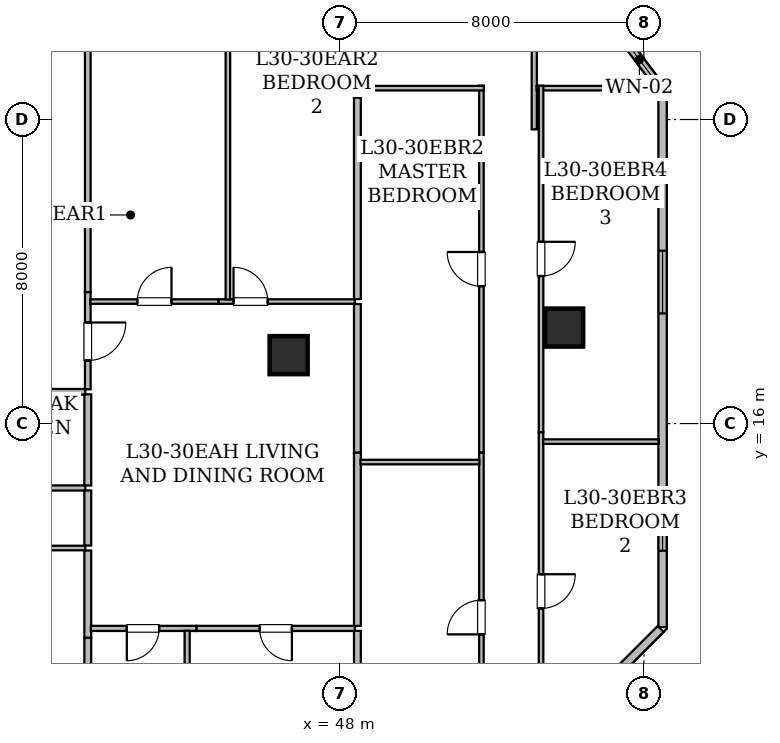
"""IFC4 building model, lengths in metres.
Left out: names, types, materials, properties, quantities, classifications, styles, units other than length and angle.
Written with IfcOpenShell. Run it as: python <this file> out.ifc"""

import sys

from ifc_helpers import new_model, si_unit, direction, frame, frame_2d, origin, origin_2d, place, context, subcontext, project, spatial, rectangle, hollow_rectangle, extrude, element, fill, save


model = new_model("IFC4")
c1 = context("Model", 3, precision=1e-05, world=origin(), true_north=direction((0.0, 1.0)))
c2 = subcontext(c1, "Body", "Model", "MODEL_VIEW")
j1 = project(units=[si_unit("LENGTHUNIT", "METRE"), si_unit("PLANEANGLEUNIT", "RADIAN")], contexts=[c1])
p1 = place(None, origin())
s1 = spatial("IfcSite", under=j1, at=p1, CompositionType="ELEMENT")
p2 = place(p1, origin())
s2 = spatial("IfcBuilding", under=s1, at=p2, CompositionType="ELEMENT")
p3 = place(p2, frame((0.0, 0.0, 120.15)))
s3 = spatial("IfcBuildingStorey", under=s2, at=p3, CompositionType="ELEMENT", Elevation=120.15)
for number, where, z_axis, x_axis in (
    (1, (53.9, 18.525, 0.0), (0.0, 0.0, 1.0), (1.0, 0.0, 0.0)),
    (2, (46.65, 17.8, 0.0), (0.0, 0.0, 1.0), (1.0, 0.0, 0.0)),
):
    element("IfcColumn", number, at=place(p3, frame(where, z_axis=z_axis, x_axis=x_axis)), inside=s3, PredefinedType="COLUMN", context=c2, shape_type="SweptSolid", body=[
        extrude(hollow_rectangle(XDim=1.0, YDim=1.0, WallThickness=0.05, at=origin_2d()), origin(), (0.0, 0.0, 1.0), 3.65),
    ])
p4 = place(p3, frame((54.119, 27.924, 0.0), z_axis=(0.0, 0.0, 1.0), x_axis=(0.600039540588, -0.799970343032, 0.0)))
e3 = element("IfcWall", 3, at=p4, inside=s3, PredefinedType="STANDARD", context=c2, shape_type="SweptSolid", body=[
    extrude(rectangle(XDim=3.952, YDim=0.22, at=frame_2d((1.976, 0.0))), origin(), (0.0, 0.0, 1.0), 3.43),
])
p5 = place(p4, frame((2.184, 0.0, 0.85)))
e4 = element("IfcOpeningElement", 4, at=p5, cuts=e3, PredefinedType="OPENING", context=c2, shape_type="SweptSolid", body=[
    extrude(rectangle(XDim=1.5, YDim=1.6, at=frame_2d((0.75, 0.8))), frame((0.0, 0.12, 0.0), z_axis=(0.0, -1.0, 0.0), x_axis=(1.0, 0.0, 0.0)), (0.0, 0.0, 1.0), 0.24),
])
p6 = place(p3, frame((56.49, 24.707, 0.0), z_axis=(0.0, 0.0, 1.0), x_axis=(0.0, -1.0, 0.0)))
e5 = element("IfcWall", 5, at=p6, inside=s3, PredefinedType="STANDARD", context=c2, shape_type="SweptSolid", body=[
    extrude(rectangle(XDim=14.061, YDim=0.22, at=frame_2d((7.031, 0.0))), origin(), (0.0, 0.0, 1.0), 3.43),
])
p7 = place(p6, frame((10.404, 0.0, 0.85)))
e6 = element("IfcOpeningElement", 6, at=p7, cuts=e5, PredefinedType="OPENING", context=c2, shape_type="SweptSolid", body=[
    extrude(rectangle(XDim=1.65, YDim=1.55, at=frame_2d((0.825, 0.775))), frame((0.0, 0.12, 0.0), z_axis=(0.0, -1.0, 0.0), x_axis=(1.0, 0.0, 0.0)), (0.0, 0.0, 1.0), 0.24),
])
p8 = place(p6, frame((4.159, 0.0, 0.85)))
e7 = element("IfcOpeningElement", 7, at=p8, cuts=e5, PredefinedType="OPENING", context=c2, shape_type="SweptSolid", body=[
    extrude(rectangle(XDim=1.65, YDim=1.55, at=frame_2d((0.825, 0.775))), frame((0.0, 0.12, 0.0), z_axis=(0.0, -1.0, 0.0), x_axis=(1.0, 0.0, 0.0)), (0.0, 0.0, 1.0), 0.24),
])
p9 = place(p3, frame((56.44, 10.596, 0.0), z_axis=(0.0, 0.0, 1.0), x_axis=(-0.707106781187, -0.707106781187, 0.0)))
e8 = element("IfcWall", 8, at=p9, inside=s3, PredefinedType="STANDARD", context=c2, shape_type="SweptSolid", body=[
    extrude(rectangle(XDim=5.778, YDim=0.22, at=frame_2d((2.889, 0.0))), origin(), (0.0, 0.0, 1.0), 3.43),
])
p10 = place(p3, frame((41.3, 16.835, 0.0), z_axis=(0.0, 0.0, 1.0), x_axis=(-1.0, 0.0, 0.0)))
e9 = element("IfcWall", 9, at=p10, inside=s3, PredefinedType="STANDARD", context=c2, shape_type="SweptSolid", body=[
    extrude(rectangle(XDim=7.001, YDim=0.15, at=frame_2d((3.5, 0.0))), origin(), (0.0, 0.0, 1.0), 2.647),
])
p11 = place(p3, frame((41.365, 19.459, 0.0), z_axis=(0.0, 0.0, 1.0), x_axis=(0.0, -1.0, 0.0)))
e10 = element("IfcWall", 10, at=p11, inside=s3, PredefinedType="STANDARD", context=c2, shape_type="SweptSolid", body=[
    extrude(rectangle(XDim=2.559, YDim=0.15, at=frame_2d((1.28, 0.0))), origin(), (0.0, 0.0, 1.0), 2.647),
])
p12 = place(p11, frame((0.8, 0.0, 0.0)))
e11 = element("IfcOpeningElement", 11, at=p12, cuts=e10, PredefinedType="OPENING", context=c2, shape_type="SweptSolid", body=[
    extrude(rectangle(XDim=1.0, YDim=2.15, at=frame_2d((0.5, 1.075))), frame((0.0, 0.085, 0.0), z_axis=(0.0, -1.0, 0.0), x_axis=(1.0, 0.0, 0.0)), (0.0, 0.0, 1.0), 0.17),
])
p13 = place(p3, frame((41.365, 30.05, 0.0), z_axis=(0.0, 0.0, 1.0), x_axis=(0.0, -1.0, 0.0)))
e12 = element("IfcWall", 12, at=p13, inside=s3, PredefinedType="STANDARD", context=c2, shape_type="SweptSolid", body=[
    extrude(rectangle(XDim=10.591, YDim=0.15, at=frame_2d((5.295, 0.0))), origin(), (0.0, 0.0, 1.0), 3.013),
])
p14 = place(p3, frame((33.985, 14.305, 0.0), z_axis=(0.0, 0.0, 1.0), x_axis=(1.0, 0.0, 0.0)))
e13 = element("IfcWall", 13, at=p14, inside=s3, PredefinedType="PARTITIONING", context=c2, shape_type="SweptSolid", body=[
    extrude(rectangle(XDim=7.315, YDim=0.135, at=frame_2d((3.657, 0.0))), origin(), (0.0, 0.0, 1.0), 2.647),
])
p15 = place(p14, frame((3.233, 0.0, 0.0)))
e14 = element("IfcOpeningElement", 14, at=p15, cuts=e13, PredefinedType="OPENING", context=c2, shape_type="SweptSolid", body=[
    extrude(rectangle(XDim=0.85, YDim=2.1, at=frame_2d((0.425, 1.05))), frame((0.0, 0.077, 0.0), z_axis=(0.0, -1.0, 0.0), x_axis=(1.0, 0.0, 0.0)), (0.0, 0.0, 1.0), 0.155),
])
p16 = place(p3, frame((41.3, 12.725, 0.0), z_axis=(0.0, 0.0, 1.0), x_axis=(-1.0, 0.0, 0.0)))
e15 = element("IfcWall", 15, at=p16, inside=s3, PredefinedType="PARTITIONING", context=c2, shape_type="SweptSolid", body=[
    extrude(rectangle(XDim=7.693, YDim=0.12, at=frame_2d((3.847, 0.0))), origin(), (0.0, 0.0, 1.0), 2.647),
])
p17 = place(p16, frame((3.396, 0.0, 0.0)))
e16 = element("IfcOpeningElement", 16, at=p17, cuts=e15, PredefinedType="OPENING", context=c2, shape_type="SweptSolid", body=[
    extrude(rectangle(XDim=0.9, YDim=2.1, at=frame_2d((0.45, 1.05))), frame((0.0, 0.07, 0.0), z_axis=(0.0, -1.0, 0.0), x_axis=(1.0, 0.0, 0.0)), (0.0, 0.0, 1.0), 0.14),
])
p18 = place(p3, frame((41.365, 14.24, 0.0), z_axis=(0.0, 0.0, 1.0), x_axis=(0.0, -1.0, 0.0)))
e17 = element("IfcWall", 17, at=p18, inside=s3, PredefinedType="STANDARD", context=c2, shape_type="SweptSolid", body=[
    extrude(rectangle(XDim=1.45, YDim=0.18, at=frame_2d((0.725, 0.0))), origin(), (0.0, 0.0, 1.0), 3.43),
])
p19 = place(p3, frame((41.365, 16.77, 0.0), z_axis=(0.0, 0.0, 1.0), x_axis=(0.0, -1.0, 0.0)))
e18 = element("IfcWall", 18, at=p19, inside=s3, PredefinedType="STANDARD", context=c2, shape_type="SweptSolid", body=[
    extrude(rectangle(XDim=2.4, YDim=0.18, at=frame_2d((1.2, 0.0))), origin(), (0.0, 0.0, 1.0), 3.43),
])
p20 = place(p3, frame((41.365, 12.66, 0.0), z_axis=(0.0, 0.0, 1.0), x_axis=(0.0, -1.0, 0.0)))
e19 = element("IfcWall", 19, at=p20, inside=s3, PredefinedType="STANDARD", context=c2, shape_type="SweptSolid", body=[
    extrude(rectangle(XDim=2.299, YDim=0.18, at=frame_2d((1.149, 0.0))), origin(), (0.0, 0.0, 1.0), 3.43),
])
p21 = place(p3, frame((41.365, 10.361, 0.0), z_axis=(0.0, 0.0, 1.0), x_axis=(0.0, -1.0, 0.0)))
e20 = element("IfcWall", 20, at=p21, inside=s3, PredefinedType="STANDARD", context=c2, shape_type="SweptSolid", body=[
    extrude(rectangle(XDim=3.749, YDim=0.18, at=frame_2d((1.875, 0.0))), origin(), (0.0, 0.0, 1.0), 2.876),
])
p22 = place(p3, frame((44.803, 19.21, 0.0), z_axis=(0.0, 0.0, 1.0), x_axis=(1.0, 0.0, 0.0)))
e21 = element("IfcWall", 21, at=p22, inside=s3, PredefinedType="PARTITIONING", context=c2, shape_type="SweptSolid", body=[
    extrude(rectangle(XDim=3.592, YDim=0.12, at=frame_2d((1.796, 0.0))), origin(), (0.0, 0.0, 1.0), 2.647),
])
p23 = place(p22, frame((0.397, 0.0, 0.0)))
e22 = element("IfcOpeningElement", 22, at=p23, cuts=e21, PredefinedType="OPENING", context=c2, shape_type="SweptSolid", body=[
    extrude(rectangle(XDim=0.9, YDim=2.1, at=frame_2d((0.45, 1.05))), frame((0.0, 0.07, 0.0), z_axis=(0.0, -1.0, 0.0), x_axis=(1.0, 0.0, 0.0)), (0.0, 0.0, 1.0), 0.14),
])
p24 = place(p3, frame((44.229, 10.61, 0.0), z_axis=(0.0, 0.0, 1.0), x_axis=(-1.0, 0.0, 0.0)))
e23 = element("IfcWall", 23, at=p24, inside=s3, PredefinedType="PARTITIONING", context=c2, shape_type="SweptSolid", body=[
    extrude(rectangle(XDim=2.782, YDim=0.135, at=frame_2d((1.391, 0.0))), origin(), (0.0, 0.0, 1.0), 3.43),
])
p25 = place(p24, frame((0.987, 0.0, 0.0)))
e24 = element("IfcOpeningElement", 24, at=p25, cuts=e23, PredefinedType="OPENING", context=c2, shape_type="SweptSolid", body=[
    extrude(rectangle(XDim=0.85, YDim=2.1, at=frame_2d((0.425, 1.05))), frame((0.0, 0.077, 0.0), z_axis=(0.0, -1.0, 0.0), x_axis=(1.0, 0.0, 0.0)), (0.0, 0.0, 1.0), 0.155),
])
p26 = place(p3, frame((48.395, 10.61, 0.0), z_axis=(0.0, 0.0, 1.0), x_axis=(-1.0, 0.0, 0.0)))
e25 = element("IfcWall", 25, at=p26, inside=s3, PredefinedType="PARTITIONING", context=c2, shape_type="SweptSolid", body=[
    extrude(rectangle(XDim=4.166, YDim=0.135, at=frame_2d((2.083, 0.0))), origin(), (0.0, 0.0, 1.0), 3.43),
])
p27 = place(p26, frame((1.658, 0.0, 0.0)))
e26 = element("IfcOpeningElement", 26, at=p27, cuts=e25, PredefinedType="OPENING", context=c2, shape_type="SweptSolid", body=[
    extrude(rectangle(XDim=0.85, YDim=2.1, at=frame_2d((0.425, 1.05))), frame((0.0, 0.077, 0.0), z_axis=(0.0, -1.0, 0.0), x_axis=(1.0, 0.0, 0.0)), (0.0, 0.0, 1.0), 0.155),
])
p28 = place(p3, frame((41.432, 19.21, 0.0), z_axis=(0.0, 0.0, 1.0), x_axis=(1.0, 0.0, 0.0)))
e27 = element("IfcWall", 27, at=p28, inside=s3, PredefinedType="PARTITIONING", context=c2, shape_type="SweptSolid", body=[
    extrude(rectangle(XDim=3.371, YDim=0.12, at=frame_2d((1.686, 0.0))), origin(), (0.0, 0.0, 1.0), 3.43),
])
p29 = place(p28, frame((1.236, 0.0, 0.0)))
e28 = element("IfcOpeningElement", 28, at=p29, cuts=e27, PredefinedType="OPENING", context=c2, shape_type="SweptSolid", body=[
    extrude(rectangle(XDim=0.9, YDim=2.1, at=frame_2d((0.45, 1.05))), frame((0.0, 0.07, 0.0), z_axis=(0.0, -1.0, 0.0), x_axis=(1.0, 0.0, 0.0)), (0.0, 0.0, 1.0), 0.14),
])
p30 = place(p3, frame((48.46, 15.237, 0.0), z_axis=(0.0, 0.0, 1.0), x_axis=(0.0, -1.0, 0.0)))
e29 = element("IfcWall", 29, at=p30, inside=s3, PredefinedType="STANDARD", context=c2, shape_type="SweptSolid", body=[
    extrude(rectangle(XDim=4.562, YDim=0.18, at=frame_2d((2.281, 0.0))), origin(), (0.0, 0.0, 1.0), 2.647),
])
p31 = place(p3, frame((48.46, 19.145, 0.0), z_axis=(0.0, 0.0, 1.0), x_axis=(0.0, -1.0, 0.0)))
e30 = element("IfcWall", 30, at=p31, inside=s3, PredefinedType="STANDARD", context=c2, shape_type="SweptSolid", body=[
    extrude(rectangle(XDim=3.908, YDim=0.18, at=frame_2d((1.954, 0.0))), origin(), (0.0, 0.0, 1.0), 2.687),
])
p32 = place(p3, frame((45.052, 19.264, 0.0), z_axis=(0.0, 0.0, 1.0), x_axis=(0.0, 1.0, 0.0)))
e31 = element("IfcWall", 31, at=p32, inside=s3, PredefinedType="PARTITIONING", context=c2, shape_type="SweptSolid", body=[
    extrude(rectangle(XDim=10.654, YDim=0.12, at=frame_2d((5.327, 0.0))), origin(), (0.0, 0.0, 1.0), 3.013),
])
p33 = place(p3, frame((48.46, 26.654, 0.0), z_axis=(0.0, 0.0, 1.0), x_axis=(0.0, -1.0, 0.0)))
e32 = element("IfcWall", 32, at=p33, inside=s3, PredefinedType="STANDARD", context=c2, shape_type="SweptSolid", body=[
    extrude(rectangle(XDim=2.078, YDim=0.18, at=frame_2d((1.039, 0.0))), origin(), (0.0, 0.0, 1.0), 3.43),
])
p34 = place(p3, frame((48.46, 24.576, 0.0), z_axis=(0.0, 0.0, 1.0), x_axis=(0.0, -1.0, 0.0)))
e33 = element("IfcWall", 33, at=p34, inside=s3, PredefinedType="STANDARD", context=c2, shape_type="SweptSolid", body=[
    extrude(rectangle(XDim=5.301, YDim=0.18, at=frame_2d((2.65, 0.0))), origin(), (0.0, 0.0, 1.0), 2.687),
])
p35 = place(p3, frame((43.98, 10.548, 0.0), z_axis=(0.0, 0.0, 1.0), x_axis=(0.0, -1.0, 0.0)))
e34 = element("IfcWall", 34, at=p35, inside=s3, PredefinedType="PARTITIONING", context=c2, shape_type="SweptSolid", body=[
    extrude(rectangle(XDim=3.936, YDim=0.135, at=frame_2d((1.968, 0.0))), origin(), (0.0, 0.0, 1.0), 2.876),
])
p36 = place(p3, frame((48.46, 10.545, 0.0), z_axis=(0.0, 0.0, 1.0), x_axis=(0.0, -1.0, 0.0)))
e35 = element("IfcWall", 35, at=p36, inside=s3, PredefinedType="STANDARD", context=c2, shape_type="SweptSolid", body=[
    extrude(rectangle(XDim=3.933, YDim=0.18, at=frame_2d((1.966, 0.0))), origin(), (0.0, 0.0, 1.0), 2.876),
])
p37 = place(p3, frame((53.114, 32.52, 0.0), z_axis=(0.0, 0.0, 1.0), x_axis=(0.0, -1.0, 0.0)))
e36 = element("IfcWall", 36, at=p37, inside=s3, PredefinedType="PARTITIONING", context=c2, shape_type="SweptSolid", body=[
    extrude(rectangle(XDim=8.78, YDim=0.135, at=frame_2d((4.39, 0.0))), origin(), (0.0, 0.0, 1.0), 3.43),
])
p38 = place(p3, frame((51.723, 6.612, 0.0), z_axis=(0.0, 0.0, 1.0), x_axis=(0.0, 1.0, 0.0)))
e37 = element("IfcWall", 37, at=p38, inside=s3, PredefinedType="PARTITIONING", context=c2, shape_type="SweptSolid", body=[
    extrude(rectangle(XDim=8.625, YDim=0.12, at=frame_2d((4.312, 0.0))), origin(), (0.0, 0.0, 1.0), 2.876),
])
p39 = place(p38, frame((3.841, 0.0, 0.0)))
e38 = element("IfcOpeningElement", 38, at=p39, cuts=e37, PredefinedType="OPENING", context=c2, shape_type="SweptSolid", body=[
    extrude(rectangle(XDim=0.9, YDim=2.1, at=frame_2d((0.45, 1.05))), frame((0.0, 0.07, 0.0), z_axis=(0.0, -1.0, 0.0), x_axis=(1.0, 0.0, 0.0)), (0.0, 0.0, 1.0), 0.14),
])
p40 = place(p3, frame((51.723, 15.237, 0.0), z_axis=(0.0, 0.0, 1.0), x_axis=(0.0, 1.0, 0.0)))
e39 = element("IfcWall", 39, at=p40, inside=s3, PredefinedType="PARTITIONING", context=c2, shape_type="SweptSolid", body=[
    extrude(rectangle(XDim=9.653, YDim=0.12, at=frame_2d((4.826, 0.0))), origin(), (0.0, 0.0, 1.0), 2.687),
])
p41 = place(p40, frame((4.377, 0.0, 0.0)))
e40 = element("IfcOpeningElement", 40, at=p41, cuts=e39, PredefinedType="OPENING", context=c2, shape_type="SweptSolid", body=[
    extrude(rectangle(XDim=0.9, YDim=2.1, at=frame_2d((0.45, 1.05))), frame((0.0, 0.07, 0.0), z_axis=(0.0, -1.0, 0.0), x_axis=(1.0, 0.0, 0.0)), (0.0, 0.0, 1.0), 0.14),
])
p42 = place(p3, frame((51.788, 24.825, 0.0), z_axis=(0.0, 0.0, 1.0), x_axis=(-1.0, 0.0, 0.0)))
e41 = element("IfcWall", 41, at=p42, inside=s3, PredefinedType="PARTITIONING", context=c2, shape_type="SweptSolid", body=[
    extrude(rectangle(XDim=3.246, YDim=0.12, at=frame_2d((1.623, 0.0))), origin(), (0.0, 0.0, 1.0), 3.43),
])
p43 = place(p3, frame((53.292, 15.774, 0.0), z_axis=(0.0, 0.0, 1.0), x_axis=(0.0, -1.0, 0.0)))
e42 = element("IfcWall", 42, at=p43, inside=s3, PredefinedType="PARTITIONING", context=c2, shape_type="SweptSolid", body=[
    extrude(rectangle(XDim=8.335, YDim=0.12, at=frame_2d((4.167, 0.0))), origin(), (0.0, 0.0, 1.0), 3.43),
])
p44 = place(p43, frame((3.739, 0.0, 0.0)))
e43 = element("IfcOpeningElement", 43, at=p44, cuts=e42, PredefinedType="OPENING", context=c2, shape_type="SweptSolid", body=[
    extrude(rectangle(XDim=0.9, YDim=2.1, at=frame_2d((0.45, 1.05))), frame((0.0, 0.07, 0.0), z_axis=(0.0, -1.0, 0.0), x_axis=(1.0, 0.0, 0.0)), (0.0, 0.0, 1.0), 0.14),
])
p45 = place(p3, frame((56.332, 24.825, 0.0), z_axis=(0.0, 0.0, 1.0), x_axis=(-1.0, 0.0, 0.0)))
e44 = element("IfcWall", 44, at=p45, inside=s3, PredefinedType="PARTITIONING", context=c2, shape_type="SweptSolid", body=[
    extrude(rectangle(XDim=3.157, YDim=0.12, at=frame_2d((1.579, 0.0))), origin(), (0.0, 0.0, 1.0), 2.876),
])
p46 = place(p3, frame((53.292, 24.89, 0.0), z_axis=(0.0, 0.0, 1.0), x_axis=(0.0, -1.0, 0.0)))
e45 = element("IfcWall", 45, at=p46, inside=s3, PredefinedType="PARTITIONING", context=c2, shape_type="SweptSolid", body=[
    extrude(rectangle(XDim=9.116, YDim=0.12, at=frame_2d((4.558, 0.0))), origin(), (0.0, 0.0, 1.0), 2.687),
])
p47 = place(p46, frame((4.108, 0.0, 0.0)))
e46 = element("IfcOpeningElement", 46, at=p47, cuts=e45, PredefinedType="OPENING", context=c2, shape_type="SweptSolid", body=[
    extrude(rectangle(XDim=0.9, YDim=2.1, at=frame_2d((0.45, 1.05))), frame((0.0, 0.07, 0.0), z_axis=(0.0, -1.0, 0.0), x_axis=(1.0, 0.0, 0.0)), (0.0, 0.0, 1.0), 0.14),
])
p48 = place(p3, frame((48.542, 14.987, 0.0), z_axis=(0.0, 0.0, 1.0), x_axis=(1.0, 0.0, 0.0)))
e47 = element("IfcWall", 47, at=p48, inside=s3, PredefinedType="PARTITIONING", context=c2, shape_type="SweptSolid", body=[
    extrude(rectangle(XDim=3.127, YDim=0.12, at=frame_2d((1.563, 0.0))), origin(), (0.0, 0.0, 1.0), 3.43),
])
p49 = place(p3, frame((53.346, 15.525, 0.0), z_axis=(0.0, 0.0, 1.0), x_axis=(1.0, 0.0, 0.0)))
e48 = element("IfcWall", 48, at=p49, inside=s3, PredefinedType="PARTITIONING", context=c2, shape_type="SweptSolid", body=[
    extrude(rectangle(XDim=3.042, YDim=0.12, at=frame_2d((1.521, 0.0))), origin(), (0.0, 0.0, 1.0), 3.43),
])
p50 = place(p5, origin())
e49 = element("IfcWindow", 49, at=p50, inside=s3, PartitioningType="SINGLE_PANEL", PredefinedType="WINDOW", context=c2, shape_type="SweptSolid", body=[
    extrude(rectangle(XDim=1.5, YDim=1.6, at=frame_2d((0.75, 0.8))), frame((0.0, 0.03, 0.0), z_axis=(0.0, -1.0, 0.0), x_axis=(1.0, 0.0, 0.0)), (0.0, 0.0, 1.0), 0.06),
])
fill(e4, e49)
p51 = place(p7, origin())
e50 = element("IfcWindow", 50, at=p51, inside=s3, PartitioningType="SINGLE_PANEL", PredefinedType="WINDOW", context=c2, shape_type="SweptSolid", body=[
    extrude(rectangle(XDim=1.65, YDim=1.55, at=frame_2d((0.825, 0.775))), frame((0.0, 0.03, 0.0), z_axis=(0.0, -1.0, 0.0), x_axis=(1.0, 0.0, 0.0)), (0.0, 0.0, 1.0), 0.06),
])
fill(e6, e50)
p52 = place(p8, origin())
e51 = element("IfcWindow", 51, at=p52, inside=s3, PartitioningType="SINGLE_PANEL", PredefinedType="WINDOW", context=c2, shape_type="SweptSolid", body=[
    extrude(rectangle(XDim=1.65, YDim=1.55, at=frame_2d((0.825, 0.775))), frame((0.0, 0.03, 0.0), z_axis=(0.0, -1.0, 0.0), x_axis=(1.0, 0.0, 0.0)), (0.0, 0.0, 1.0), 0.06),
])
fill(e7, e51)
p53 = place(p12, origin())
e52 = element("IfcDoor", 52, at=p53, inside=s3, OperationType="SINGLE_SWING_LEFT", PredefinedType="DOOR", context=c2, shape_type="SweptSolid", body=[
    extrude(rectangle(XDim=1.0, YDim=2.15, at=frame_2d((0.5, 1.075))), frame((0.0, 0.025, 0.0), z_axis=(0.0, -1.0, 0.0), x_axis=(1.0, 0.0, 0.0)), (0.0, 0.0, 1.0), 0.05),
])
fill(e11, e52)
p54 = place(p23, origin())
e53 = element("IfcDoor", 53, at=p54, inside=s3, OperationType="SINGLE_SWING_LEFT", PredefinedType="DOOR", context=c2, shape_type="SweptSolid", body=[
    extrude(rectangle(XDim=0.9, YDim=2.1, at=frame_2d((0.45, 1.05))), frame((0.0, 0.025, 0.0), z_axis=(0.0, -1.0, 0.0), x_axis=(1.0, 0.0, 0.0)), (0.0, 0.0, 1.0), 0.05),
])
fill(e22, e53)
p55 = place(p25, origin())
e54 = element("IfcDoor", 54, at=p55, inside=s3, OperationType="SINGLE_SWING_RIGHT", PredefinedType="DOOR", context=c2, shape_type="SweptSolid", body=[
    extrude(rectangle(XDim=0.85, YDim=2.1, at=frame_2d((0.425, 1.05))), frame((0.0, 0.025, 0.0), z_axis=(0.0, -1.0, 0.0), x_axis=(1.0, 0.0, 0.0)), (0.0, 0.0, 1.0), 0.05),
])
fill(e24, e54)
p56 = place(p27, origin())
e55 = element("IfcDoor", 55, at=p56, inside=s3, OperationType="SINGLE_SWING_LEFT", PredefinedType="DOOR", context=c2, shape_type="SweptSolid", body=[
    extrude(rectangle(XDim=0.85, YDim=2.1, at=frame_2d((0.425, 1.05))), frame((0.0, 0.025, 0.0), z_axis=(0.0, -1.0, 0.0), x_axis=(1.0, 0.0, 0.0)), (0.0, 0.0, 1.0), 0.05),
])
fill(e26, e55)
p57 = place(p29, origin())
e56 = element("IfcDoor", 56, at=p57, inside=s3, OperationType="SINGLE_SWING_RIGHT", PredefinedType="DOOR", context=c2, shape_type="SweptSolid", body=[
    extrude(rectangle(XDim=0.9, YDim=2.1, at=frame_2d((0.45, 1.05))), frame((0.0, 0.025, 0.0), z_axis=(0.0, -1.0, 0.0), x_axis=(1.0, 0.0, 0.0)), (0.0, 0.0, 1.0), 0.05),
])
fill(e28, e56)
p58 = place(p39, origin())
e57 = element("IfcDoor", 57, at=p58, inside=s3, OperationType="SINGLE_SWING_LEFT", PredefinedType="DOOR", context=c2, shape_type="SweptSolid", body=[
    extrude(rectangle(XDim=0.9, YDim=2.1, at=frame_2d((0.45, 1.05))), frame((0.0, 0.025, 0.0), z_axis=(0.0, -1.0, 0.0), x_axis=(1.0, 0.0, 0.0)), (0.0, 0.0, 1.0), 0.05),
])
fill(e38, e57)
p59 = place(p41, origin())
e58 = element("IfcDoor", 58, at=p59, inside=s3, OperationType="SINGLE_SWING_RIGHT", PredefinedType="DOOR", context=c2, shape_type="SweptSolid", body=[
    extrude(rectangle(XDim=0.9, YDim=2.1, at=frame_2d((0.45, 1.05))), frame((0.0, 0.025, 0.0), z_axis=(0.0, -1.0, 0.0), x_axis=(1.0, 0.0, 0.0)), (0.0, 0.0, 1.0), 0.05),
])
fill(e40, e58)
p60 = place(p44, origin())
e59 = element("IfcDoor", 59, at=p60, inside=s3, OperationType="SINGLE_SWING_LEFT", PredefinedType="DOOR", context=c2, shape_type="SweptSolid", body=[
    extrude(rectangle(XDim=0.9, YDim=2.1, at=frame_2d((0.45, 1.05))), frame((0.0, 0.025, 0.0), z_axis=(0.0, -1.0, 0.0), x_axis=(1.0, 0.0, 0.0)), (0.0, 0.0, 1.0), 0.05),
])
fill(e43, e59)
p61 = place(p47, origin())
e60 = element("IfcDoor", 60, at=p61, inside=s3, OperationType="SINGLE_SWING_LEFT", PredefinedType="DOOR", context=c2, shape_type="SweptSolid", body=[
    extrude(rectangle(XDim=0.9, YDim=2.1, at=frame_2d((0.45, 1.05))), frame((0.0, 0.025, 0.0), z_axis=(0.0, -1.0, 0.0), x_axis=(1.0, 0.0, 0.0)), (0.0, 0.0, 1.0), 0.05),
])
fill(e46, e60)
save(model, sys.argv[1])
